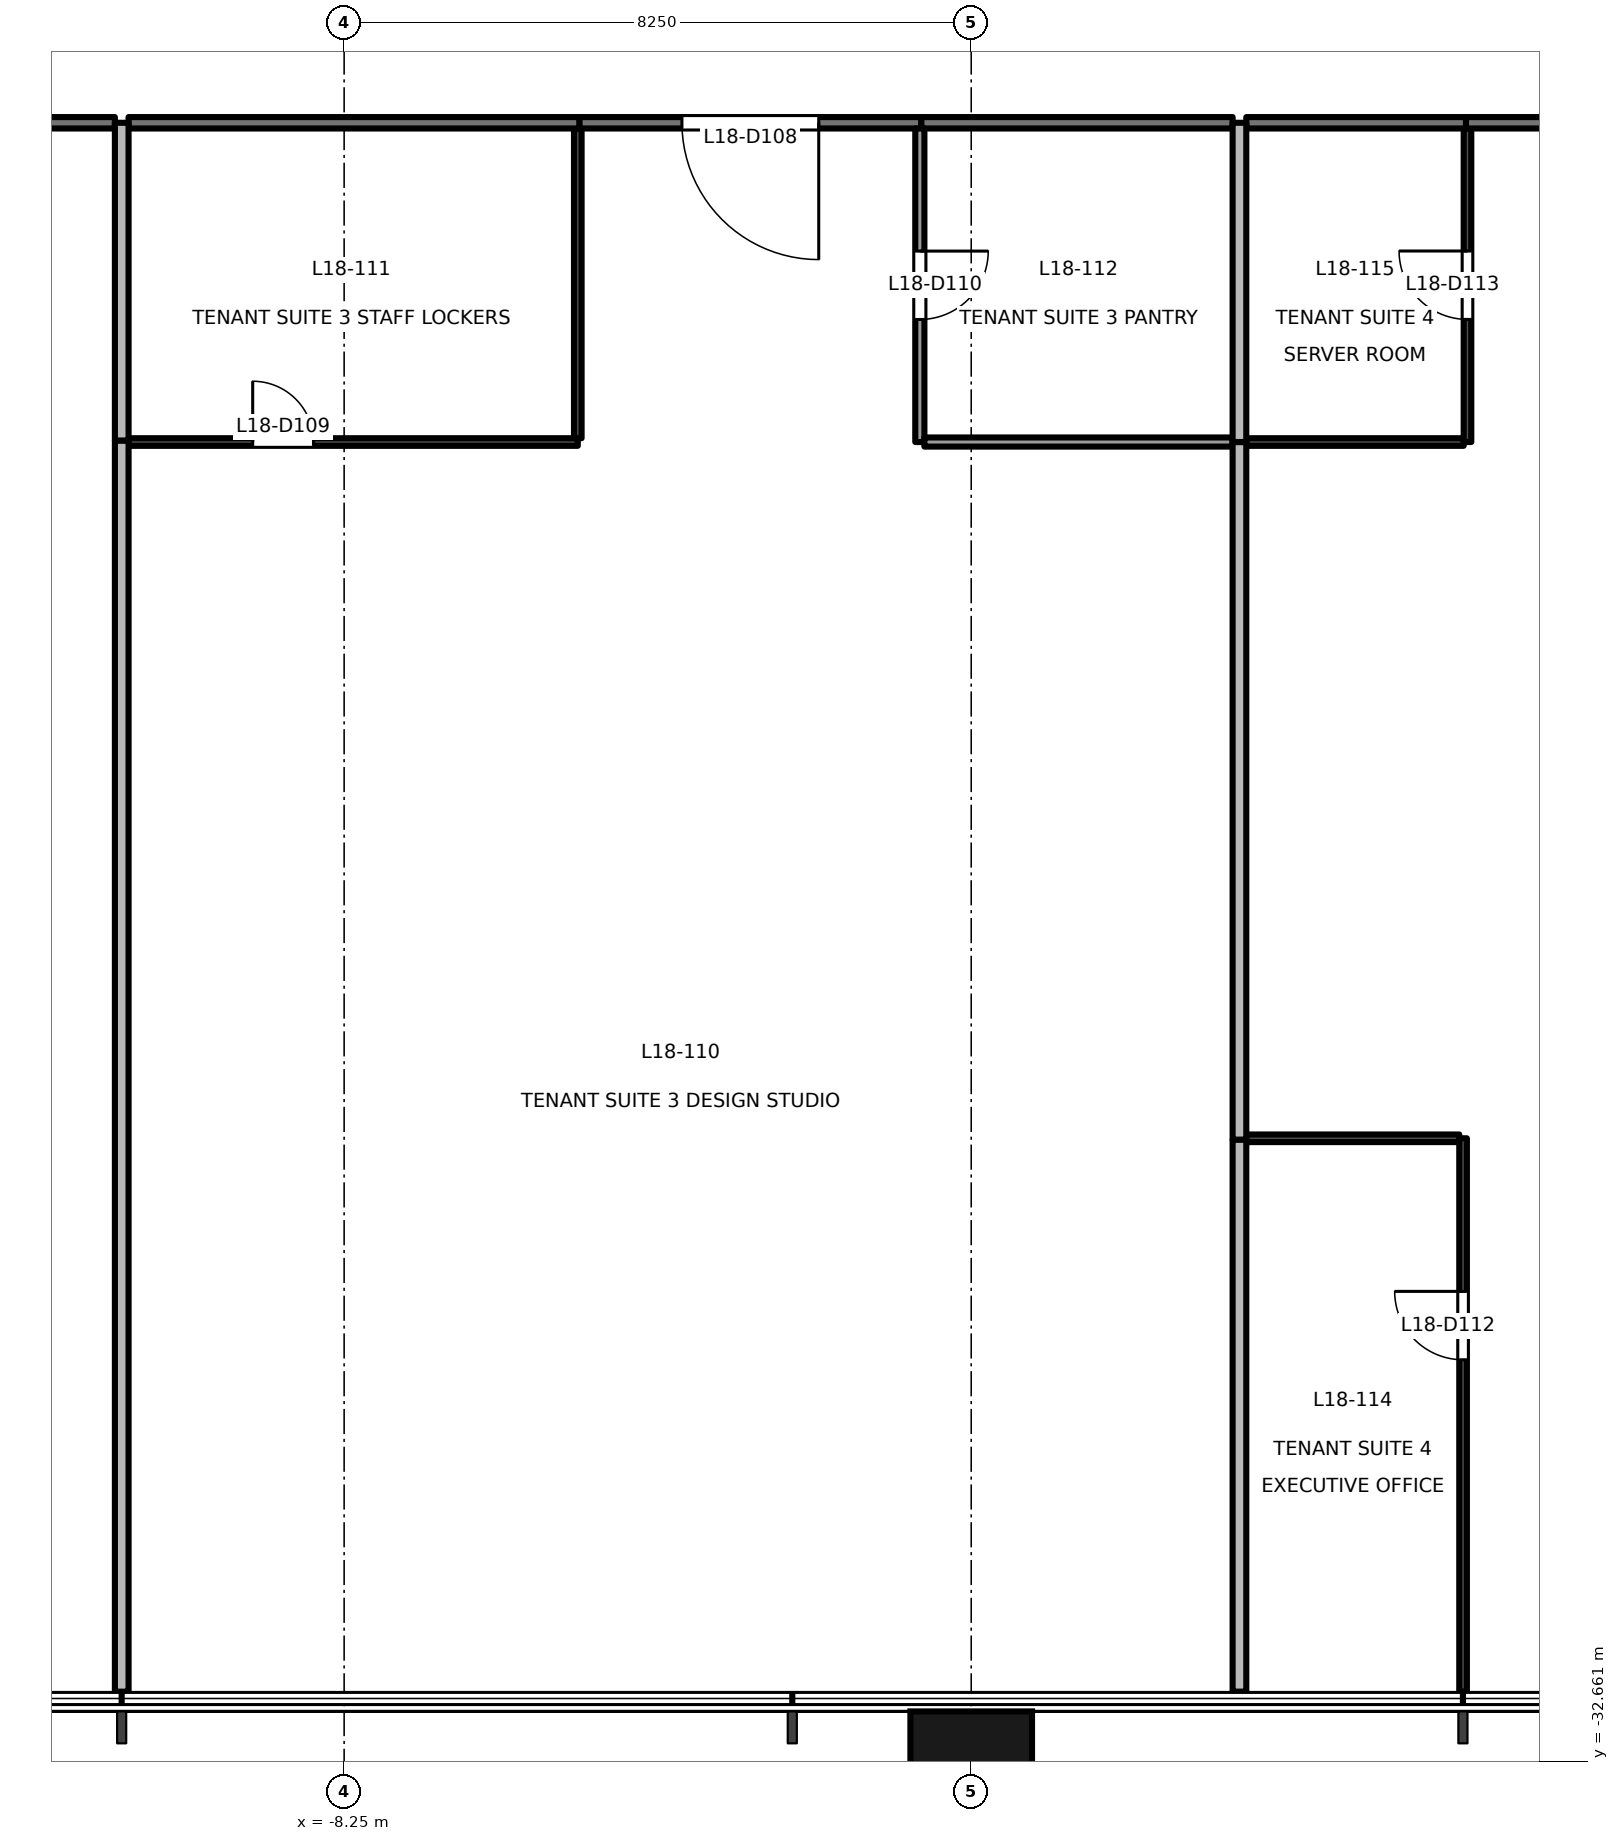
"""IFC4 building model, lengths in metres.
Left out: names, types, materials, properties, quantities, classifications, styles, units other than length and angle.
Written with IfcOpenShell. Run it as: python <this file> out.ifc"""

import sys

from ifc_helpers import new_model, si_unit, direction, frame, frame_2d, origin, origin_2d, place, context, subcontext, project, spatial, rectangle, extrude, element, fill, save


model = new_model("IFC4")
c1 = context("Model", 3, precision=1e-05, world=origin(), true_north=direction((0.0, 1.0)))
c2 = subcontext(c1, "Body", "Model", "MODEL_VIEW")
j1 = project(units=[si_unit("LENGTHUNIT", "METRE"), si_unit("PLANEANGLEUNIT", "RADIAN")], contexts=[c1])
p1 = place(None, origin())
s1 = spatial("IfcSite", under=j1, at=p1, CompositionType="ELEMENT")
p2 = place(p1, origin())
s2 = spatial("IfcBuilding", under=s1, at=p2, CompositionType="ELEMENT")
p3 = place(p2, frame((0.0, 0.0, 83.7)))
s3 = spatial("IfcBuildingStorey", under=s2, at=p3, CompositionType="ELEMENT", Elevation=83.7)
p4 = place(p3, frame((0.0, -32.9, -0.2), z_axis=(0.0, 0.0, 1.0), x_axis=(1.0, 0.0, 0.0)))
e1 = element("IfcColumn", 1, at=p4, inside=s3, PredefinedType="COLUMN", context=c2, shape_type="SweptSolid", body=[
    extrude(rectangle(XDim=1.6, YDim=1.8, at=origin_2d()), origin(), (0.0, 0.0, 1.0), 4.0),
])
p5 = place(p3, frame((-11.266, -11.1, 0.0), z_axis=(0.0, 0.0, 1.0), x_axis=(-1.0, 0.0, 0.0)))
e2 = element("IfcWall", 2, at=p5, inside=s3, PredefinedType="PARTITIONING", context=c2, shape_type="SweptSolid", body=[
    extrude(rectangle(XDim=6.754, YDim=0.15, at=frame_2d((3.377, 0.0))), origin(), (0.0, 0.0, 1.0), 2.8),
])
p6 = place(p5, frame((1.438, 0.0, 0.0)))
e3 = element("IfcOpeningElement", 3, at=p6, cuts=e2, PredefinedType="OPENING", context=c2, shape_type="SweptSolid", body=[
    extrude(rectangle(XDim=1.5, YDim=2.1, at=frame_2d((0.75, 1.05))), frame((0.0, 0.085, 0.0), z_axis=(0.0, -1.0, 0.0), x_axis=(1.0, 0.0, 0.0)), (0.0, 0.0, 1.0), 0.171),
])
p7 = place(p3, frame((-0.656, -11.1, 0.0), z_axis=(0.0, 0.0, 1.0), x_axis=(-1.0, 0.0, 0.0)))
e4 = element("IfcWall", 4, at=p7, inside=s3, PredefinedType="PARTITIONING", context=c2, shape_type="SweptSolid", body=[
    extrude(rectangle(XDim=4.5, YDim=0.15, at=frame_2d((2.25, 0.0))), origin(), (0.0, 0.0, 1.0), 2.8),
])
p8 = place(p7, frame((1.35, 0.0, 0.0)))
e5 = element("IfcOpeningElement", 5, at=p8, cuts=e4, PredefinedType="OPENING", context=c2, shape_type="SweptSolid", body=[
    extrude(rectangle(XDim=1.8, YDim=2.1, at=frame_2d((0.9, 1.05))), frame((0.0, 0.085, 0.0), z_axis=(0.0, -1.0, 0.0), x_axis=(1.0, 0.0, 0.0)), (0.0, 0.0, 1.0), 0.171),
])
p9 = place(p3, frame((-5.156, -11.1, 0.0), z_axis=(0.0, 0.0, 1.0), x_axis=(-1.0, 0.0, 0.0)))
e6 = element("IfcWall", 6, at=p9, inside=s3, PredefinedType="PARTITIONING", context=c2, shape_type="SweptSolid", body=[
    extrude(rectangle(XDim=5.93, YDim=0.15, at=frame_2d((2.965, 0.0))), origin(), (0.0, 0.0, 1.0), 2.8),
])
p10 = place(p3, frame((3.439, -11.1, 0.0), z_axis=(0.0, 0.0, 1.0), x_axis=(-1.0, 0.0, 0.0)))
e7 = element("IfcWall", 7, at=p10, inside=s3, PredefinedType="PARTITIONING", context=c2, shape_type="SweptSolid", body=[
    extrude(rectangle(XDim=4.095, YDim=0.15, at=frame_2d((2.047, 0.0))), origin(), (0.0, 0.0, 1.0), 2.8),
])
p11 = place(p3, frame((12.549, -11.1, 0.0), z_axis=(0.0, 0.0, 1.0), x_axis=(-1.0, 0.0, 0.0)))
e8 = element("IfcWall", 8, at=p11, inside=s3, PredefinedType="PARTITIONING", context=c2, shape_type="SweptSolid", body=[
    extrude(rectangle(XDim=6.04, YDim=0.15, at=frame_2d((3.02, 0.0))), origin(), (0.0, 0.0, 1.0), 2.8),
])
p12 = place(p11, frame((2.12, 0.0, 0.0)))
e9 = element("IfcOpeningElement", 9, at=p12, cuts=e8, PredefinedType="OPENING", context=c2, shape_type="SweptSolid", body=[
    extrude(rectangle(XDim=1.8, YDim=2.1, at=frame_2d((0.9, 1.05))), frame((0.0, 0.085, 0.0), z_axis=(0.0, -1.0, 0.0), x_axis=(1.0, 0.0, 0.0)), (0.0, 0.0, 1.0), 0.171),
])
p13 = place(p3, frame((6.509, -11.1, 0.0), z_axis=(0.0, 0.0, 1.0), x_axis=(-1.0, 0.0, 0.0)))
e10 = element("IfcWall", 10, at=p13, inside=s3, PredefinedType="PARTITIONING", context=c2, shape_type="SweptSolid", body=[
    extrude(rectangle(XDim=2.89, YDim=0.15, at=frame_2d((1.445, 0.0))), origin(), (0.0, 0.0, 1.0), 2.8),
])
p14 = place(p3, frame((-11.176, -15.28, 0.0), z_axis=(0.0, 0.0, 1.0), x_axis=(0.0, -1.0, 0.0)))
e11 = element("IfcWall", 11, at=p14, inside=s3, PredefinedType="PARTITIONING", context=c2, shape_type="SweptSolid", body=[
    extrude(rectangle(XDim=16.46, YDim=0.18, at=frame_2d((8.23, 0.0))), origin(), (0.0, 0.0, 1.0), 3.8),
])
p15 = place(p3, frame((-11.176, -11.1, 0.0), z_axis=(0.0, 0.0, 1.0), x_axis=(0.0, -1.0, 0.0)))
e12 = element("IfcWall", 12, at=p15, inside=s3, PredefinedType="PARTITIONING", context=c2, shape_type="SweptSolid", body=[
    extrude(rectangle(XDim=4.18, YDim=0.18, at=frame_2d((2.09, 0.0))), origin(), (0.0, 0.0, 1.0), 3.8),
])
p16 = place(p3, frame((-11.086, -15.3, 0.0), z_axis=(0.0, 0.0, 1.0), x_axis=(1.0, 0.0, 0.0)))
e13 = element("IfcWall", 13, at=p16, inside=s3, PredefinedType="PARTITIONING", context=c2, shape_type="SweptSolid", body=[
    extrude(rectangle(XDim=5.91, YDim=0.1, at=frame_2d((2.955, 0.0))), origin(), (0.0, 0.0, 1.0), 2.8),
])
p17 = place(p16, frame((1.633, 0.0, 0.0)))
e14 = element("IfcOpeningElement", 14, at=p17, cuts=e13, PredefinedType="OPENING", context=c2, shape_type="SweptSolid", body=[
    extrude(rectangle(XDim=0.8, YDim=2.1, at=frame_2d((0.4, 1.05))), frame((0.0, 0.061, 0.0), z_axis=(0.0, -1.0, 0.0), x_axis=(1.0, 0.0, 0.0)), (0.0, 0.0, 1.0), 0.121),
])
p18 = place(p3, frame((-5.176, -15.25, 0.0), z_axis=(0.0, 0.0, 1.0), x_axis=(0.0, 1.0, 0.0)))
e15 = element("IfcWall", 15, at=p18, inside=s3, PredefinedType="PARTITIONING", context=c2, shape_type="SweptSolid", body=[
    extrude(rectangle(XDim=4.075, YDim=0.1, at=frame_2d((2.038, 0.0))), origin(), (0.0, 0.0, 1.0), 3.8),
])
p19 = place(p3, frame((-0.676, -11.175, 0.0), z_axis=(0.0, 0.0, 1.0), x_axis=(0.0, -1.0, 0.0)))
e16 = element("IfcWall", 16, at=p19, inside=s3, PredefinedType="PARTITIONING", context=c2, shape_type="SweptSolid", body=[
    extrude(rectangle(XDim=4.125, YDim=0.12, at=frame_2d((2.062, 0.0))), origin(), (0.0, 0.0, 1.0), 3.8),
])
p20 = place(p19, frame((1.613, 0.0, 0.0)))
e17 = element("IfcOpeningElement", 17, at=p20, cuts=e16, PredefinedType="OPENING", context=c2, shape_type="SweptSolid", body=[
    extrude(rectangle(XDim=0.9, YDim=2.1, at=frame_2d((0.45, 1.05))), frame((0.0, 0.071, 0.0), z_axis=(0.0, -1.0, 0.0), x_axis=(1.0, 0.0, 0.0)), (0.0, 0.0, 1.0), 0.141),
])
p21 = place(p3, frame((-0.616, -15.3, 0.0), z_axis=(0.0, 0.0, 1.0), x_axis=(1.0, 0.0, 0.0)))
e18 = element("IfcWall", 18, at=p21, inside=s3, PredefinedType="PARTITIONING", context=c2, shape_type="SweptSolid", body=[
    extrude(rectangle(XDim=4.055, YDim=0.12, at=frame_2d((2.027, 0.0))), origin(), (0.0, 0.0, 1.0), 2.8),
])
p22 = place(p3, frame((3.529, -15.3, 0.0), z_axis=(0.0, 0.0, 1.0), x_axis=(0.0, -1.0, 0.0)))
e19 = element("IfcWall", 19, at=p22, inside=s3, PredefinedType="PARTITIONING", context=c2, shape_type="SweptSolid", body=[
    extrude(rectangle(XDim=9.18, YDim=0.18, at=frame_2d((4.59, 0.0))), origin(), (0.0, 0.0, 1.0), 3.8),
])
p23 = place(p3, frame((3.529, -24.48, 0.0), z_axis=(0.0, 0.0, 1.0), x_axis=(0.0, -1.0, 0.0)))
e20 = element("IfcWall", 20, at=p23, inside=s3, PredefinedType="PARTITIONING", context=c2, shape_type="SweptSolid", body=[
    extrude(rectangle(XDim=7.26, YDim=0.18, at=frame_2d((3.63, 0.0))), origin(), (0.0, 0.0, 1.0), 3.8),
])
p24 = place(p3, frame((3.529, -11.1, 0.0), z_axis=(0.0, 0.0, 1.0), x_axis=(0.0, -1.0, 0.0)))
e21 = element("IfcWall", 21, at=p24, inside=s3, PredefinedType="PARTITIONING", context=c2, shape_type="SweptSolid", body=[
    extrude(rectangle(XDim=4.2, YDim=0.18, at=frame_2d((2.1, 0.0))), origin(), (0.0, 0.0, 1.0), 3.8),
])
p25 = place(p3, frame((6.421, -24.46, 0.0), z_axis=(0.0, 0.0, 1.0), x_axis=(-1.0, 0.0, 0.0)))
e22 = element("IfcWall", 22, at=p25, inside=s3, PredefinedType="PARTITIONING", context=c2, shape_type="SweptSolid", body=[
    extrude(rectangle(XDim=2.802, YDim=0.1, at=frame_2d((1.401, 0.0))), origin(), (0.0, 0.0, 1.0), 2.8),
])
p26 = place(p3, frame((6.471, -31.74, 0.0), z_axis=(0.0, 0.0, 1.0), x_axis=(0.0, 1.0, 0.0)))
e23 = element("IfcWall", 23, at=p26, inside=s3, PredefinedType="PARTITIONING", context=c2, shape_type="SweptSolid", body=[
    extrude(rectangle(XDim=7.28, YDim=0.1, at=frame_2d((3.64, 0.0))), origin(), (0.0, 0.0, 1.0), 3.8),
])
p27 = place(p26, frame((4.366, 0.0, 0.0)))
e24 = element("IfcOpeningElement", 24, at=p27, cuts=e23, PredefinedType="OPENING", context=c2, shape_type="SweptSolid", body=[
    extrude(rectangle(XDim=0.9, YDim=2.1, at=frame_2d((0.45, 1.05))), frame((0.0, 0.061, 0.0), z_axis=(0.0, -1.0, 0.0), x_axis=(1.0, 0.0, 0.0)), (0.0, 0.0, 1.0), 0.121),
])
p28 = place(p3, frame((3.619, -15.3, 0.0), z_axis=(0.0, 0.0, 1.0), x_axis=(1.0, 0.0, 0.0)))
e25 = element("IfcWall", 25, at=p28, inside=s3, PredefinedType="PARTITIONING", context=c2, shape_type="SweptSolid", body=[
    extrude(rectangle(XDim=2.86, YDim=0.1, at=frame_2d((1.43, 0.0))), origin(), (0.0, 0.0, 1.0), 2.8),
])
p29 = place(p3, frame((6.529, -15.3, 0.0), z_axis=(0.0, 0.0, 1.0), x_axis=(0.0, 1.0, 0.0)))
e26 = element("IfcWall", 26, at=p29, inside=s3, PredefinedType="PARTITIONING", context=c2, shape_type="SweptSolid", body=[
    extrude(rectangle(XDim=4.125, YDim=0.1, at=frame_2d((2.062, 0.0))), origin(), (0.0, 0.0, 1.0), 3.8),
])
p30 = place(p29, frame((1.613, 0.0, 0.0)))
e27 = element("IfcOpeningElement", 27, at=p30, cuts=e26, PredefinedType="OPENING", context=c2, shape_type="SweptSolid", body=[
    extrude(rectangle(XDim=0.9, YDim=2.1, at=frame_2d((0.45, 1.05))), frame((0.0, 0.061, 0.0), z_axis=(0.0, -1.0, 0.0), x_axis=(1.0, 0.0, 0.0)), (0.0, 0.0, 1.0), 0.121),
])
p31 = place(p8, origin())
e28 = element("IfcDoor", 28, at=p31, inside=s3, OperationType="DOUBLE_DOOR_SINGLE_SWING", PredefinedType="DOOR", context=c2, shape_type="SweptSolid", body=[
    extrude(rectangle(XDim=1.8, YDim=2.1, at=frame_2d((0.9, 1.05))), frame((0.0, 0.025, 0.0), z_axis=(0.0, -1.0, 0.0), x_axis=(1.0, 0.0, 0.0)), (0.0, 0.0, 1.0), 0.05),
])
fill(e5, e28)
p32 = place(p17, origin())
e29 = element("IfcDoor", 29, at=p32, inside=s3, OperationType="SINGLE_SWING_LEFT", PredefinedType="DOOR", context=c2, shape_type="SweptSolid", body=[
    extrude(rectangle(XDim=0.8, YDim=2.1, at=frame_2d((0.4, 1.05))), frame((0.0, 0.025, 0.0), z_axis=(0.0, -1.0, 0.0), x_axis=(1.0, 0.0, 0.0)), (0.0, 0.0, 1.0), 0.05),
])
fill(e14, e29)
p33 = place(p20, origin())
e30 = element("IfcDoor", 30, at=p33, inside=s3, OperationType="SINGLE_SWING_LEFT", PredefinedType="DOOR", context=c2, shape_type="SweptSolid", body=[
    extrude(rectangle(XDim=0.9, YDim=2.1, at=frame_2d((0.45, 1.05))), frame((0.0, 0.025, 0.0), z_axis=(0.0, -1.0, 0.0), x_axis=(1.0, 0.0, 0.0)), (0.0, 0.0, 1.0), 0.05),
])
fill(e17, e30)
p34 = place(p27, origin())
e31 = element("IfcDoor", 31, at=p34, inside=s3, OperationType="SINGLE_SWING_RIGHT", PredefinedType="DOOR", context=c2, shape_type="SweptSolid", body=[
    extrude(rectangle(XDim=0.9, YDim=2.1, at=frame_2d((0.45, 1.05))), frame((0.0, 0.025, 0.0), z_axis=(0.0, -1.0, 0.0), x_axis=(1.0, 0.0, 0.0)), (0.0, 0.0, 1.0), 0.05),
])
fill(e24, e31)
p35 = place(p30, origin())
e32 = element("IfcDoor", 32, at=p35, inside=s3, OperationType="SINGLE_SWING_RIGHT", PredefinedType="DOOR", context=c2, shape_type="SweptSolid", body=[
    extrude(rectangle(XDim=0.9, YDim=2.1, at=frame_2d((0.45, 1.05))), frame((0.0, 0.025, 0.0), z_axis=(0.0, -1.0, 0.0), x_axis=(1.0, 0.0, 0.0)), (0.0, 0.0, 1.0), 0.05),
])
fill(e27, e32)
save(model, sys.argv[1])
